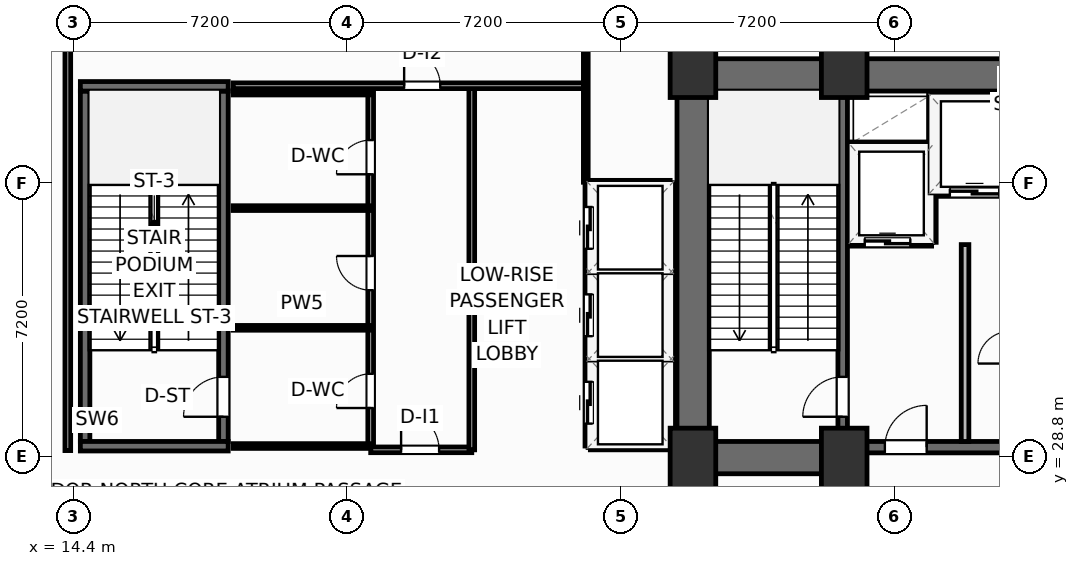
"""IFC4 building model, lengths in metres.
Left out: names, types, materials, properties, quantities, classifications, styles, units other than length and angle.
Written with IfcOpenShell. Run it as: python <this file> out.ifc"""

import sys

from ifc_helpers import new_model, si_unit, direction, frame, frame_2d, origin, origin_2d, place, context, subcontext, project, spatial, rectangle, extrude, element, fill, save


model = new_model("IFC4")
c1 = context("Model", 3, precision=1e-05, world=origin(), true_north=direction((0.0, 1.0)))
c2 = subcontext(c1, "Body", "Model", "MODEL_VIEW")
j1 = project(units=[si_unit("LENGTHUNIT", "METRE"), si_unit("PLANEANGLEUNIT", "RADIAN")], contexts=[c1])
p1 = place(None, origin())
s1 = spatial("IfcSite", under=j1, at=p1, CompositionType="ELEMENT")
p2 = place(p1, origin())
s2 = spatial("IfcBuilding", under=s1, at=p2, CompositionType="ELEMENT")
p3 = place(p2, frame((0.0, 0.0, 16.2)))
s3 = spatial("IfcBuildingStorey", under=s2, at=p3, CompositionType="ELEMENT", Elevation=16.2)
for number, where, z_axis, x_axis in (
    (1, (30.7, 28.75, 0.0), (0.0, 0.0, 1.0), (1.0, 0.0, 0.0)),
    (2, (34.68, 28.75, 0.0), (0.0, 0.0, 1.0), (1.0, 0.0, 0.0)),
    (3, (30.7, 39.05, 0.0), (0.0, 0.0, 1.0), (1.0, 0.0, 0.0)),
    (4, (34.68, 39.05, 0.0), (0.0, 0.0, 1.0), (1.0, 0.0, 0.0)),
):
    element("IfcColumn", number, at=place(p3, frame(where, z_axis=z_axis, x_axis=x_axis)), inside=s3, PredefinedType="COLUMN", context=c2, shape_type="SweptSolid", body=[
        extrude(rectangle(XDim=1.2, YDim=1.6, at=origin_2d()), origin(), (0.0, 0.0, 1.0), 5.4),
    ])
p4 = place(p3, frame((30.28, 38.845, 0.0), z_axis=(0.0, 0.0, 1.0), x_axis=(1.0, 0.0, 0.0)))
e5 = element("IfcWall", 5, at=p4, inside=s3, PredefinedType="SHEAR", context=c2, shape_type="SweptSolid", body=[
    extrude(rectangle(XDim=17.84, YDim=0.85, at=frame_2d((8.92, 0.0))), origin(), (0.0, 0.0, 1.0), 5.08),
])
p5 = place(p3, frame((30.705, 29.2, 0.0), z_axis=(0.0, 0.0, 1.0), x_axis=(0.0, 1.0, 0.0)))
e6 = element("IfcWall", 6, at=p5, inside=s3, PredefinedType="SHEAR", context=c2, shape_type="SweptSolid", body=[
    extrude(rectangle(XDim=9.22, YDim=0.85, at=frame_2d((4.61, 0.0))), origin(), (0.0, 0.0, 1.0), 5.08),
])
p6 = place(p3, frame((30.28, 28.775, 0.0), z_axis=(0.0, 0.0, 1.0), x_axis=(1.0, 0.0, 0.0)))
e7 = element("IfcWall", 7, at=p6, inside=s3, PredefinedType="SHEAR", context=c2, shape_type="SweptSolid", body=[
    extrude(rectangle(XDim=4.52, YDim=0.85, at=frame_2d((2.26, 0.0))), origin(), (0.0, 0.0, 1.0), 5.08),
])
p7 = place(p3, frame((34.8, 29.05, 0.0), z_axis=(0.0, 0.0, 1.0), x_axis=(1.0, 0.0, 0.0)))
e8 = element("IfcWall", 8, at=p7, inside=s3, PredefinedType="SHEAR", context=c2, shape_type="SweptSolid", body=[
    extrude(rectangle(XDim=8.8, YDim=0.3, at=frame_2d((4.4, 0.0))), origin(), (0.0, 0.0, 1.0), 5.08),
])
p8 = place(p7, frame((0.95, 0.0, 0.0)))
e9 = element("IfcOpeningElement", 9, at=p8, cuts=e8, PredefinedType="OPENING", context=c2, shape_type="SweptSolid", body=[
    extrude(rectangle(XDim=1.1, YDim=2.15, at=frame_2d((0.55, 1.075))), frame((0.0, 0.16, 0.0), z_axis=(0.0, -1.0, 0.0), x_axis=(1.0, 0.0, 0.0)), (0.0, 0.0, 1.0), 0.32),
])
p9 = place(p7, frame((6.75, 0.0, 0.0)))
e10 = element("IfcOpeningElement", 10, at=p9, cuts=e8, PredefinedType="OPENING", context=c2, shape_type="SweptSolid", body=[
    extrude(rectangle(XDim=1.1, YDim=2.15, at=frame_2d((0.55, 1.075))), frame((0.0, 0.16, 0.0), z_axis=(0.0, -1.0, 0.0), x_axis=(1.0, 0.0, 0.0)), (0.0, 0.0, 1.0), 0.32),
])
p10 = place(p7, frame((4.45, 0.0, 0.0)))
e11 = element("IfcOpeningElement", 11, at=p10, cuts=e8, PredefinedType="OPENING", context=c2, shape_type="SweptSolid", body=[
    extrude(rectangle(XDim=0.95, YDim=2.15, at=frame_2d((0.475, 1.075))), frame((0.0, 0.16, 0.0), z_axis=(0.0, -1.0, 0.0), x_axis=(1.0, 0.0, 0.0)), (0.0, 0.0, 1.0), 0.32),
])
p11 = place(p3, frame((34.64, 29.2, 0.0), z_axis=(0.0, 0.0, 1.0), x_axis=(0.0, 1.0, 0.0)))
e12 = element("IfcWall", 12, at=p11, inside=s3, PredefinedType="SHEAR", context=c2, shape_type="SweptSolid", body=[
    extrude(rectangle(XDim=9.22, YDim=0.25, at=frame_2d((4.61, 0.0))), origin(), (0.0, 0.0, 1.0), 5.08),
])
p12 = place(p11, frame((0.65, 0.0, 0.0)))
e13 = element("IfcOpeningElement", 13, at=p12, cuts=e12, PredefinedType="OPENING", context=c2, shape_type="SweptSolid", body=[
    extrude(rectangle(XDim=1.05, YDim=2.15, at=frame_2d((0.525, 1.075))), frame((0.0, 0.135, 0.0), z_axis=(0.0, -1.0, 0.0), x_axis=(1.0, 0.0, 0.0)), (0.0, 0.0, 1.0), 0.27),
])
p13 = place(p3, frame((14.705, 29.2, 0.0), z_axis=(0.0, 0.0, 1.0), x_axis=(0.0, 1.0, 0.0)))
e14 = element("IfcWall", 14, at=p13, inside=s3, PredefinedType="SHEAR", context=c2, shape_type="SweptSolid", body=[
    extrude(rectangle(XDim=9.22, YDim=0.25, at=frame_2d((4.61, 0.0))), origin(), (0.0, 0.0, 1.0), 5.08),
])
p14 = place(p3, frame((18.345, 29.2, 0.0), z_axis=(0.0, 0.0, 1.0), x_axis=(0.0, 1.0, 0.0)))
e15 = element("IfcWall", 15, at=p14, inside=s3, PredefinedType="SHEAR", context=c2, shape_type="SweptSolid", body=[
    extrude(rectangle(XDim=9.22, YDim=0.25, at=frame_2d((4.61, 0.0))), origin(), (0.0, 0.0, 1.0), 5.08),
])
p15 = place(p14, frame((0.65, 0.0, 0.0)))
e16 = element("IfcOpeningElement", 16, at=p15, cuts=e15, PredefinedType="OPENING", context=c2, shape_type="SweptSolid", body=[
    extrude(rectangle(XDim=1.05, YDim=2.15, at=frame_2d((0.525, 1.075))), frame((0.0, 0.135, 0.0), z_axis=(0.0, -1.0, 0.0), x_axis=(1.0, 0.0, 0.0)), (0.0, 0.0, 1.0), 0.27),
])
for number, where, z_axis, x_axis in (
    (17, (14.58, 38.545, 0.0), (0.0, 0.0, 1.0), (1.0, 0.0, 0.0)),
    (18, (14.58, 29.075, 0.0), (0.0, 0.0, 1.0), (1.0, 0.0, 0.0)),
):
    element("IfcWall", number, at=place(p3, frame(where, z_axis=z_axis, x_axis=x_axis)), inside=s3, PredefinedType="SHEAR", context=c2, shape_type="SweptSolid", body=[
        extrude(rectangle(XDim=3.89, YDim=0.25, at=frame_2d((1.945, 0.0))), origin(), (0.0, 0.0, 1.0), 5.08),
    ])
p16 = place(p3, frame((22.22, 28.98, 0.0), z_axis=(0.0, 0.0, 1.0), x_axis=(1.0, 0.0, 0.0)))
e19 = element("IfcWall", 19, at=p16, inside=s3, PredefinedType="PARTITIONING", context=c2, shape_type="SweptSolid", body=[
    extrude(rectangle(XDim=2.66, YDim=0.15, at=frame_2d((1.33, 0.0))), origin(), (0.0, 0.0, 1.0), 5.08),
])
p17 = place(p16, frame((0.8, 0.0, 0.0)))
e20 = element("IfcOpeningElement", 20, at=p17, cuts=e19, PredefinedType="OPENING", context=c2, shape_type="SweptSolid", body=[
    extrude(rectangle(XDim=1.0, YDim=2.05, at=frame_2d((0.5, 1.025))), frame((0.0, 0.085, 0.0), z_axis=(0.0, -1.0, 0.0), x_axis=(1.0, 0.0, 0.0)), (0.0, 0.0, 1.0), 0.17),
])
p18 = place(p3, frame((24.88, 28.98, 0.0), z_axis=(0.0, 0.0, 1.0), x_axis=(0.0, 1.0, 0.0)))
e21 = element("IfcWall", 21, at=p18, inside=s3, PredefinedType="PARTITIONING", context=c2, shape_type="SweptSolid", body=[
    extrude(rectangle(XDim=9.58, YDim=0.15, at=frame_2d((4.79, 0.0))), origin(), (0.0, 0.0, 1.0), 5.08),
])
p19 = place(p3, frame((22.22, 29.08, 0.0), z_axis=(0.0, 0.0, 1.0), x_axis=(0.0, 1.0, 0.0)))
e22 = element("IfcWall", 22, at=p19, inside=s3, PredefinedType="PARTITIONING", context=c2, shape_type="SweptSolid", body=[
    extrude(rectangle(XDim=9.3, YDim=0.15, at=frame_2d((4.65, 0.0))), origin(), (0.0, 0.0, 1.0), 5.08),
])
p20 = place(p19, frame((1.0, 0.0, 0.0)))
e23 = element("IfcOpeningElement", 23, at=p20, cuts=e22, PredefinedType="OPENING", context=c2, shape_type="SweptSolid", body=[
    extrude(rectangle(XDim=0.9, YDim=2.05, at=frame_2d((0.45, 1.025))), frame((0.0, 0.085, 0.0), z_axis=(0.0, -1.0, 0.0), x_axis=(1.0, 0.0, 0.0)), (0.0, 0.0, 1.0), 0.17),
])
p21 = place(p19, frame((4.1, 0.0, 0.0)))
e24 = element("IfcOpeningElement", 24, at=p21, cuts=e22, PredefinedType="OPENING", context=c2, shape_type="SweptSolid", body=[
    extrude(rectangle(XDim=0.9, YDim=2.05, at=frame_2d((0.45, 1.025))), frame((0.0, 0.085, 0.0), z_axis=(0.0, -1.0, 0.0), x_axis=(1.0, 0.0, 0.0)), (0.0, 0.0, 1.0), 0.17),
])
p22 = place(p19, frame((7.15, 0.0, 0.0)))
e25 = element("IfcOpeningElement", 25, at=p22, cuts=e22, PredefinedType="OPENING", context=c2, shape_type="SweptSolid", body=[
    extrude(rectangle(XDim=0.9, YDim=2.05, at=frame_2d((0.45, 1.025))), frame((0.0, 0.085, 0.0), z_axis=(0.0, -1.0, 0.0), x_axis=(1.0, 0.0, 0.0)), (0.0, 0.0, 1.0), 0.17),
])
for number, where, z_axis, x_axis in (
    (26, (18.6, 29.08, 0.0), (0.0, 0.0, 1.0), (1.0, 0.0, 0.0)),
    (27, (18.6, 32.19, 0.0), (0.0, 0.0, 1.0), (1.0, 0.0, 0.0)),
    (28, (18.6, 35.34, 0.0), (0.0, 0.0, 1.0), (1.0, 0.0, 0.0)),
    (29, (18.6, 38.38, 0.0), (0.0, 0.0, 1.0), (1.0, 0.0, 0.0)),
):
    element("IfcWall", number, at=place(p3, frame(where, z_axis=z_axis, x_axis=x_axis)), inside=s3, PredefinedType="PARTITIONING", context=c2, shape_type="SweptSolid", body=[
        extrude(rectangle(XDim=3.62, YDim=0.125, at=frame_2d((1.81, 0.0))), origin(), (0.0, 0.0, 1.0), 5.08),
    ])
p23 = place(p3, frame((18.6, 38.56, 0.0), z_axis=(0.0, 0.0, 1.0), x_axis=(1.0, 0.0, 0.0)))
e30 = element("IfcWall", 30, at=p23, inside=s3, PredefinedType="PARTITIONING", context=c2, shape_type="SweptSolid", body=[
    extrude(rectangle(XDim=9.28, YDim=0.15, at=frame_2d((4.64, 0.0))), origin(), (0.0, 0.0, 1.0), 5.08),
])
p24 = place(p23, frame((4.5, 0.0, 0.0)))
e31 = element("IfcOpeningElement", 31, at=p24, cuts=e30, PredefinedType="OPENING", context=c2, shape_type="SweptSolid", body=[
    extrude(rectangle(XDim=0.95, YDim=2.05, at=frame_2d((0.475, 1.025))), frame((0.0, 0.085, 0.0), z_axis=(0.0, -1.0, 0.0), x_axis=(1.0, 0.0, 0.0)), (0.0, 0.0, 1.0), 0.17),
])
p25 = place(p3, frame((27.88, 36.02, 0.0), z_axis=(0.0, 0.0, 1.0), x_axis=(0.0, 1.0, 0.0)))
e32 = element("IfcWall", 32, at=p25, inside=s3, PredefinedType="PARTITIONING", context=c2, shape_type="SweptSolid", body=[
    extrude(rectangle(XDim=14.18, YDim=0.125, at=frame_2d((7.09, 0.0))), origin(), (0.0, 0.0, 1.0), 5.08),
])
p26 = place(p3, frame((14.25, 28.96, 0.0), z_axis=(0.0, 0.0, 1.0), x_axis=(0.0, 1.0, 0.0)))
e33 = element("IfcWall", 33, at=p26, inside=s3, PredefinedType="PARTITIONING", context=c2, shape_type="SweptSolid", body=[
    extrude(rectangle(XDim=21.34, YDim=0.15, at=frame_2d((10.67, 0.0))), origin(), (0.0, 0.0, 1.0), 5.08),
])
p27 = place(p26, frame((10.62, 0.0, 0.0)))
e34 = element("IfcOpeningElement", 34, at=p27, cuts=e33, PredefinedType="OPENING", context=c2, shape_type="SweptSolid", body=[
    extrude(rectangle(XDim=1.0, YDim=2.05, at=frame_2d((0.5, 1.025))), frame((0.0, 0.085, 0.0), z_axis=(0.0, -1.0, 0.0), x_axis=(1.0, 0.0, 0.0)), (0.0, 0.0, 1.0), 0.17),
])
p28 = place(p3, frame((37.86, 29.2, 0.0), z_axis=(0.0, 0.0, 1.0), x_axis=(0.0, 1.0, 0.0)))
e35 = element("IfcWall", 35, at=p28, inside=s3, PredefinedType="PARTITIONING", context=c2, shape_type="SweptSolid", body=[
    extrude(rectangle(XDim=5.18, YDim=0.2, at=frame_2d((2.59, 0.0))), origin(), (0.0, 0.0, 1.0), 5.08),
])
p29 = place(p3, frame((34.8, 34.44, 0.0), z_axis=(0.0, 0.0, 1.0), x_axis=(1.0, 0.0, 0.0)))
e36 = element("IfcWall", 36, at=p29, inside=s3, PredefinedType="PARTITIONING", context=c2, shape_type="SweptSolid", body=[
    extrude(rectangle(XDim=2.18, YDim=0.2, at=frame_2d((1.09, 0.0))), origin(), (0.0, 0.0, 1.0), 5.08),
])
p30 = place(p29, frame((0.42, 0.0, 0.0)))
e37 = element("IfcOpeningElement", 37, at=p30, cuts=e36, PredefinedType="OPENING", context=c2, shape_type="SweptSolid", body=[
    extrude(rectangle(XDim=1.2, YDim=2.2, at=frame_2d((0.6, 1.1))), frame((0.0, 0.11, 0.0), z_axis=(0.0, -1.0, 0.0), x_axis=(1.0, 0.0, 0.0)), (0.0, 0.0, 1.0), 0.22),
])
p31 = place(p3, frame((34.8, 36.98, 0.0), z_axis=(0.0, 0.0, 1.0), x_axis=(1.0, 0.0, 0.0)))
e38 = element("IfcWall", 38, at=p31, inside=s3, PredefinedType="PARTITIONING", context=c2, shape_type="SweptSolid", body=[
    extrude(rectangle(XDim=2.18, YDim=0.2, at=frame_2d((1.09, 0.0))), origin(), (0.0, 0.0, 1.0), 5.08),
])
p32 = place(p3, frame((37.0, 34.44, 0.0), z_axis=(0.0, 0.0, 1.0), x_axis=(0.0, 1.0, 0.0)))
e39 = element("IfcWall", 39, at=p32, inside=s3, PredefinedType="PARTITIONING", context=c2, shape_type="SweptSolid", body=[
    extrude(rectangle(XDim=3.9, YDim=0.2, at=frame_2d((1.95, 0.0))), origin(), (0.0, 0.0, 1.0), 5.08),
])
p33 = place(p3, frame((37.06, 35.75, 0.0), z_axis=(0.0, 0.0, 1.0), x_axis=(1.0, 0.0, 0.0)))
e40 = element("IfcWall", 40, at=p33, inside=s3, PredefinedType="PARTITIONING", context=c2, shape_type="SweptSolid", body=[
    extrude(rectangle(XDim=2.12, YDim=0.2, at=frame_2d((1.06, 0.0))), origin(), (0.0, 0.0, 1.0), 5.08),
])
p34 = place(p33, frame((0.4, 0.0, 0.0)))
e41 = element("IfcOpeningElement", 41, at=p34, cuts=e40, PredefinedType="OPENING", context=c2, shape_type="SweptSolid", body=[
    extrude(rectangle(XDim=1.3, YDim=2.2, at=frame_2d((0.65, 1.1))), frame((0.0, 0.11, 0.0), z_axis=(0.0, -1.0, 0.0), x_axis=(1.0, 0.0, 0.0)), (0.0, 0.0, 1.0), 0.22),
])
for number, where, z_axis, x_axis in (
    (42, (28.02, 31.375, 0.0), (0.0, 0.0, 1.0), (1.0, 0.0, 0.0)),
    (43, (28.02, 33.675, 0.0), (0.0, 0.0, 1.0), (1.0, 0.0, 0.0)),
):
    element("IfcWall", number, at=place(p3, frame(where, z_axis=z_axis, x_axis=x_axis)), inside=s3, PredefinedType="PARTITIONING", context=c2, shape_type="SweptSolid", body=[
        extrude(rectangle(XDim=2.06, YDim=0.2, at=frame_2d((1.03, 0.0))), origin(), (0.0, 0.0, 1.0), 5.08),
    ])
for number, where, z_axis, x_axis in (
    (44, (28.0, 29.08, 0.0), (0.0, 0.0, 1.0), (1.0, 0.0, 0.0)),
    (45, (28.0, 35.97, 0.0), (0.0, 0.0, 1.0), (1.0, 0.0, 0.0)),
):
    element("IfcWall", number, at=place(p3, frame(where, z_axis=z_axis, x_axis=x_axis)), inside=s3, PredefinedType="PARTITIONING", context=c2, shape_type="SweptSolid", body=[
        extrude(rectangle(XDim=2.1, YDim=0.2, at=frame_2d((1.05, 0.0))), origin(), (0.0, 0.0, 1.0), 5.08),
    ])
p35 = place(p3, frame((30.12, 29.08, 0.0), z_axis=(0.0, 0.0, 1.0), x_axis=(0.0, 1.0, 0.0)))
e46 = element("IfcWall", 46, at=p35, inside=s3, PredefinedType="PARTITIONING", context=c2, shape_type="SweptSolid", body=[
    extrude(rectangle(XDim=6.89, YDim=0.2, at=frame_2d((3.445, 0.0))), origin(), (0.0, 0.0, 1.0), 5.08),
])
p36 = place(p3, frame((27.96, 29.08, 0.0), z_axis=(0.0, 0.0, 1.0), x_axis=(0.0, 1.0, 0.0)))
e47 = element("IfcWall", 47, at=p36, inside=s3, PredefinedType="PARTITIONING", context=c2, shape_type="SweptSolid", body=[
    extrude(rectangle(XDim=6.89, YDim=0.2, at=frame_2d((3.445, 0.0))), origin(), (0.0, 0.0, 1.0), 5.08),
])
p37 = place(p36, frame((0.59, 0.0, 0.0)))
e48 = element("IfcOpeningElement", 48, at=p37, cuts=e47, PredefinedType="OPENING", context=c2, shape_type="SweptSolid", body=[
    extrude(rectangle(XDim=1.1, YDim=2.15, at=frame_2d((0.55, 1.075))), frame((0.0, 0.11, 0.0), z_axis=(0.0, -1.0, 0.0), x_axis=(1.0, 0.0, 0.0)), (0.0, 0.0, 1.0), 0.22),
])
p38 = place(p36, frame((2.89, 0.0, 0.0)))
e49 = element("IfcOpeningElement", 49, at=p38, cuts=e47, PredefinedType="OPENING", context=c2, shape_type="SweptSolid", body=[
    extrude(rectangle(XDim=1.1, YDim=2.15, at=frame_2d((0.55, 1.075))), frame((0.0, 0.11, 0.0), z_axis=(0.0, -1.0, 0.0), x_axis=(1.0, 0.0, 0.0)), (0.0, 0.0, 1.0), 0.22),
])
p39 = place(p36, frame((5.19, 0.0, 0.0)))
e50 = element("IfcOpeningElement", 50, at=p39, cuts=e47, PredefinedType="OPENING", context=c2, shape_type="SweptSolid", body=[
    extrude(rectangle(XDim=1.1, YDim=2.15, at=frame_2d((0.55, 1.075))), frame((0.0, 0.11, 0.0), z_axis=(0.0, -1.0, 0.0), x_axis=(1.0, 0.0, 0.0)), (0.0, 0.0, 1.0), 0.22),
])
p40 = place(p17, origin())
e51 = element("IfcDoor", 51, at=p40, inside=s3, OperationType="SINGLE_SWING_LEFT", PredefinedType="DOOR", context=c2, shape_type="SweptSolid", body=[
    extrude(rectangle(XDim=1.0, YDim=2.05, at=frame_2d((0.5, 1.025))), frame((0.0, 0.025, 0.0), z_axis=(0.0, -1.0, 0.0), x_axis=(1.0, 0.0, 0.0)), (0.0, 0.0, 1.0), 0.05),
])
fill(e20, e51)
p41 = place(p20, origin())
e52 = element("IfcDoor", 52, at=p41, inside=s3, OperationType="SINGLE_SWING_LEFT", PredefinedType="DOOR", context=c2, shape_type="SweptSolid", body=[
    extrude(rectangle(XDim=0.9, YDim=2.05, at=frame_2d((0.45, 1.025))), frame((0.0, 0.025, 0.0), z_axis=(0.0, -1.0, 0.0), x_axis=(1.0, 0.0, 0.0)), (0.0, 0.0, 1.0), 0.05),
])
fill(e23, e52)
p42 = place(p21, origin())
e53 = element("IfcDoor", 53, at=p42, inside=s3, OperationType="SINGLE_SWING_RIGHT", PredefinedType="DOOR", context=c2, shape_type="SweptSolid", body=[
    extrude(rectangle(XDim=0.9, YDim=2.05, at=frame_2d((0.45, 1.025))), frame((0.0, 0.025, 0.0), z_axis=(0.0, -1.0, 0.0), x_axis=(1.0, 0.0, 0.0)), (0.0, 0.0, 1.0), 0.05),
])
fill(e24, e53)
p43 = place(p22, origin())
e54 = element("IfcDoor", 54, at=p43, inside=s3, OperationType="SINGLE_SWING_LEFT", PredefinedType="DOOR", context=c2, shape_type="SweptSolid", body=[
    extrude(rectangle(XDim=0.9, YDim=2.05, at=frame_2d((0.45, 1.025))), frame((0.0, 0.025, 0.0), z_axis=(0.0, -1.0, 0.0), x_axis=(1.0, 0.0, 0.0)), (0.0, 0.0, 1.0), 0.05),
])
fill(e25, e54)
p44 = place(p24, origin())
e55 = element("IfcDoor", 55, at=p44, inside=s3, OperationType="SINGLE_SWING_LEFT", PredefinedType="DOOR", context=c2, shape_type="SweptSolid", body=[
    extrude(rectangle(XDim=0.95, YDim=2.05, at=frame_2d((0.475, 1.025))), frame((0.0, 0.025, 0.0), z_axis=(0.0, -1.0, 0.0), x_axis=(1.0, 0.0, 0.0)), (0.0, 0.0, 1.0), 0.05),
])
fill(e31, e55)
p45 = place(p12, origin())
e56 = element("IfcDoor", 56, at=p45, inside=s3, OperationType="SINGLE_SWING_LEFT", PredefinedType="DOOR", context=c2, shape_type="SweptSolid", body=[
    extrude(rectangle(XDim=1.05, YDim=2.15, at=frame_2d((0.525, 1.075))), frame((0.0, 0.025, 0.0), z_axis=(0.0, -1.0, 0.0), x_axis=(1.0, 0.0, 0.0)), (0.0, 0.0, 1.0), 0.05),
])
fill(e13, e56)
p46 = place(p15, origin())
e57 = element("IfcDoor", 57, at=p46, inside=s3, OperationType="SINGLE_SWING_LEFT", PredefinedType="DOOR", context=c2, shape_type="SweptSolid", body=[
    extrude(rectangle(XDim=1.05, YDim=2.15, at=frame_2d((0.525, 1.075))), frame((0.0, 0.025, 0.0), z_axis=(0.0, -1.0, 0.0), x_axis=(1.0, 0.0, 0.0)), (0.0, 0.0, 1.0), 0.05),
])
fill(e16, e57)
p47 = place(p8, origin())
e58 = element("IfcDoor", 58, at=p47, inside=s3, OperationType="SINGLE_SWING_RIGHT", PredefinedType="DOOR", context=c2, shape_type="SweptSolid", body=[
    extrude(rectangle(XDim=1.1, YDim=2.15, at=frame_2d((0.55, 1.075))), frame((0.0, 0.025, 0.0), z_axis=(0.0, -1.0, 0.0), x_axis=(1.0, 0.0, 0.0)), (0.0, 0.0, 1.0), 0.05),
])
fill(e9, e58)
p48 = place(p30, origin())
e59 = element("IfcDoor", 59, at=p48, inside=s3, OperationType="SLIDING_TO_LEFT", PredefinedType="DOOR", context=c2, shape_type="SweptSolid", body=[
    extrude(rectangle(XDim=1.2, YDim=2.2, at=frame_2d((0.6, 1.1))), frame((0.0, 0.025, 0.0), z_axis=(0.0, -1.0, 0.0), x_axis=(1.0, 0.0, 0.0)), (0.0, 0.0, 1.0), 0.05),
])
fill(e37, e59)
p49 = place(p34, origin())
e60 = element("IfcDoor", 60, at=p49, inside=s3, OperationType="SLIDING_TO_LEFT", PredefinedType="DOOR", context=c2, shape_type="SweptSolid", body=[
    extrude(rectangle(XDim=1.3, YDim=2.2, at=frame_2d((0.65, 1.1))), frame((0.0, 0.025, 0.0), z_axis=(0.0, -1.0, 0.0), x_axis=(1.0, 0.0, 0.0)), (0.0, 0.0, 1.0), 0.05),
])
fill(e41, e60)
p50 = place(p37, origin())
e61 = element("IfcDoor", 61, at=p50, inside=s3, OperationType="SLIDING_TO_LEFT", PredefinedType="DOOR", context=c2, shape_type="SweptSolid", body=[
    extrude(rectangle(XDim=1.1, YDim=2.15, at=frame_2d((0.55, 1.075))), frame((0.0, 0.025, 0.0), z_axis=(0.0, -1.0, 0.0), x_axis=(1.0, 0.0, 0.0)), (0.0, 0.0, 1.0), 0.05),
])
fill(e48, e61)
p51 = place(p38, origin())
e62 = element("IfcDoor", 62, at=p51, inside=s3, OperationType="SLIDING_TO_LEFT", PredefinedType="DOOR", context=c2, shape_type="SweptSolid", body=[
    extrude(rectangle(XDim=1.1, YDim=2.15, at=frame_2d((0.55, 1.075))), frame((0.0, 0.025, 0.0), z_axis=(0.0, -1.0, 0.0), x_axis=(1.0, 0.0, 0.0)), (0.0, 0.0, 1.0), 0.05),
])
fill(e49, e62)
p52 = place(p39, origin())
e63 = element("IfcDoor", 63, at=p52, inside=s3, OperationType="SLIDING_TO_LEFT", PredefinedType="DOOR", context=c2, shape_type="SweptSolid", body=[
    extrude(rectangle(XDim=1.1, YDim=2.15, at=frame_2d((0.55, 1.075))), frame((0.0, 0.025, 0.0), z_axis=(0.0, -1.0, 0.0), x_axis=(1.0, 0.0, 0.0)), (0.0, 0.0, 1.0), 0.05),
])
fill(e50, e63)
save(model, sys.argv[1])
